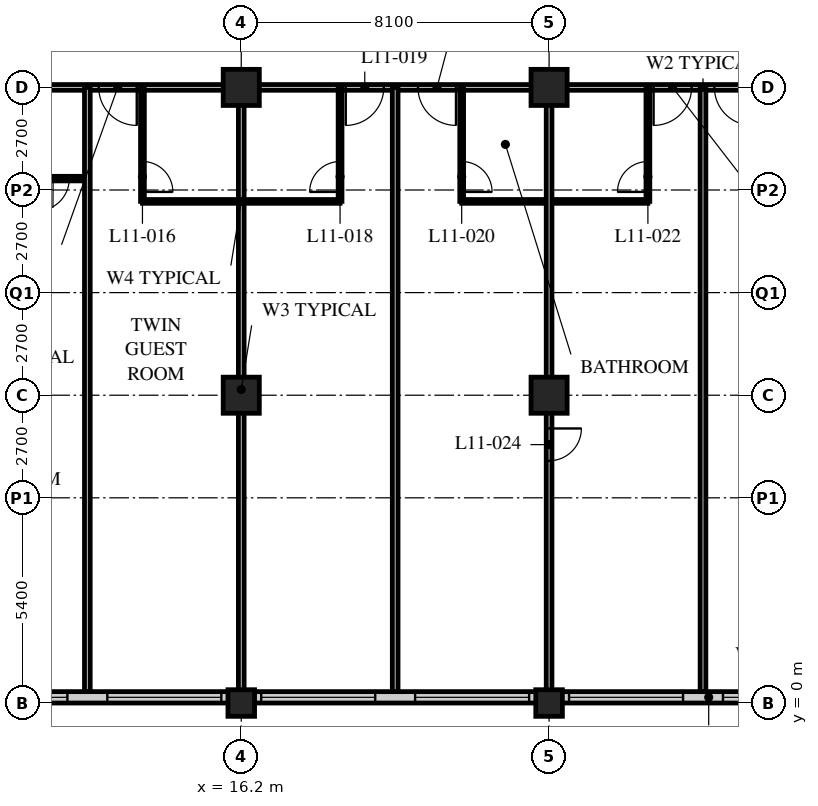
"""IFC4 building model, lengths in metres.
Left out: names, types, materials, properties, quantities, classifications, styles, units other than length and angle.
Written with IfcOpenShell. Run it as: python <this file> out.ifc"""

import sys

from ifc_helpers import new_model, si_unit, direction, frame, frame_2d, origin, origin_2d, place, context, subcontext, project, spatial, rectangle, hollow_rectangle, extrude, element, fill, save


model = new_model("IFC4")
c1 = context("Model", 3, precision=1e-05, world=origin(), true_north=direction((0.0, 1.0)))
c2 = subcontext(c1, "Body", "Model", "MODEL_VIEW")
j1 = project(units=[si_unit("LENGTHUNIT", "METRE"), si_unit("PLANEANGLEUNIT", "RADIAN")], contexts=[c1])
p1 = place(None, origin())
s1 = spatial("IfcSite", under=j1, at=p1, CompositionType="ELEMENT")
p2 = place(p1, origin())
s2 = spatial("IfcBuilding", under=s1, at=p2, CompositionType="ELEMENT")
p3 = place(p2, frame((0.0, 0.0, 50.0)))
s3 = spatial("IfcBuildingStorey", under=s2, at=p3, CompositionType="ELEMENT", Elevation=50.0)
p4 = place(p3, frame((16.2, 0.0, 0.0), z_axis=(0.0, 0.0, 1.0), x_axis=(1.0, 0.0, 0.0)))
e1 = element("IfcColumn", 1, at=p4, inside=s3, PredefinedType="COLUMN", context=c2, shape_type="SweptSolid", body=[
    extrude(hollow_rectangle(XDim=0.7, YDim=0.7, WallThickness=0.06, at=origin_2d()), origin(), (0.0, 0.0, 1.0), 3.4),
])
for number, where, z_axis, x_axis in (
    (2, (16.2, 8.1, 0.0), (0.0, 0.0, 1.0), (1.0, 0.0, 0.0)),
    (3, (16.2, 16.2, 0.0), (0.0, 0.0, 1.0), (1.0, 0.0, 0.0)),
):
    element("IfcColumn", number, at=place(p3, frame(where, z_axis=z_axis, x_axis=x_axis)), inside=s3, PredefinedType="COLUMN", context=c2, shape_type="SweptSolid", body=[
        extrude(hollow_rectangle(XDim=0.95, YDim=0.95, WallThickness=0.095, at=origin_2d()), origin(), (0.0, 0.0, 1.0), 3.4),
    ])
p5 = place(p3, frame((24.3, 0.0, 0.0), z_axis=(0.0, 0.0, 1.0), x_axis=(1.0, 0.0, 0.0)))
e4 = element("IfcColumn", 4, at=p5, inside=s3, PredefinedType="COLUMN", context=c2, shape_type="SweptSolid", body=[
    extrude(hollow_rectangle(XDim=0.7, YDim=0.7, WallThickness=0.06, at=origin_2d()), origin(), (0.0, 0.0, 1.0), 3.4),
])
for number, where, z_axis, x_axis in (
    (5, (24.3, 8.1, 0.0), (0.0, 0.0, 1.0), (1.0, 0.0, 0.0)),
    (6, (24.3, 16.2, 0.0), (0.0, 0.0, 1.0), (1.0, 0.0, 0.0)),
):
    element("IfcColumn", number, at=place(p3, frame(where, z_axis=z_axis, x_axis=x_axis)), inside=s3, PredefinedType="COLUMN", context=c2, shape_type="SweptSolid", body=[
        extrude(hollow_rectangle(XDim=0.95, YDim=0.95, WallThickness=0.095, at=origin_2d()), origin(), (0.0, 0.0, 1.0), 3.4),
    ])
p6 = place(p3, frame((8.4, 0.15, 0.0), z_axis=(0.0, 0.0, 1.0), x_axis=(1.0, 0.0, 0.0)))
e7 = element("IfcWall", 7, at=p6, inside=s3, PredefinedType="SOLIDWALL", context=c2, shape_type="SweptSolid", body=[
    extrude(rectangle(XDim=40.2, YDim=0.3, at=frame_2d((20.1, 0.0))), origin(), (0.0, 0.0, 1.0), 3.19),
])
p7 = place(p6, frame((0.225, 0.0, 0.9)))
e8 = element("IfcOpeningElement", 8, at=p7, cuts=e7, PredefinedType="OPENING", context=c2, shape_type="SweptSolid", body=[
    extrude(rectangle(XDim=3.0, YDim=2.0, at=frame_2d((1.5, 1.0))), frame((0.0, 0.16, 0.0), z_axis=(0.0, -1.0, 0.0), x_axis=(1.0, 0.0, 0.0)), (0.0, 0.0, 1.0), 0.32),
])
p8 = place(p6, frame((4.275, 0.0, 0.9)))
e9 = element("IfcOpeningElement", 9, at=p8, cuts=e7, PredefinedType="OPENING", context=c2, shape_type="SweptSolid", body=[
    extrude(rectangle(XDim=3.0, YDim=2.0, at=frame_2d((1.5, 1.0))), frame((0.0, 0.16, 0.0), z_axis=(0.0, -1.0, 0.0), x_axis=(1.0, 0.0, 0.0)), (0.0, 0.0, 1.0), 0.32),
])
p9 = place(p6, frame((8.325, 0.0, 0.9)))
e10 = element("IfcOpeningElement", 10, at=p9, cuts=e7, PredefinedType="OPENING", context=c2, shape_type="SweptSolid", body=[
    extrude(rectangle(XDim=3.0, YDim=2.0, at=frame_2d((1.5, 1.0))), frame((0.0, 0.16, 0.0), z_axis=(0.0, -1.0, 0.0), x_axis=(1.0, 0.0, 0.0)), (0.0, 0.0, 1.0), 0.32),
])
p10 = place(p6, frame((12.375, 0.0, 0.9)))
e11 = element("IfcOpeningElement", 11, at=p10, cuts=e7, PredefinedType="OPENING", context=c2, shape_type="SweptSolid", body=[
    extrude(rectangle(XDim=3.0, YDim=2.0, at=frame_2d((1.5, 1.0))), frame((0.0, 0.16, 0.0), z_axis=(0.0, -1.0, 0.0), x_axis=(1.0, 0.0, 0.0)), (0.0, 0.0, 1.0), 0.32),
])
p11 = place(p6, frame((16.425, 0.0, 0.9)))
e12 = element("IfcOpeningElement", 12, at=p11, cuts=e7, PredefinedType="OPENING", context=c2, shape_type="SweptSolid", body=[
    extrude(rectangle(XDim=3.0, YDim=2.0, at=frame_2d((1.5, 1.0))), frame((0.0, 0.16, 0.0), z_axis=(0.0, -1.0, 0.0), x_axis=(1.0, 0.0, 0.0)), (0.0, 0.0, 1.0), 0.32),
])
p12 = place(p6, frame((20.475, 0.0, 0.9)))
e13 = element("IfcOpeningElement", 13, at=p12, cuts=e7, PredefinedType="OPENING", context=c2, shape_type="SweptSolid", body=[
    extrude(rectangle(XDim=3.0, YDim=2.0, at=frame_2d((1.5, 1.0))), frame((0.0, 0.16, 0.0), z_axis=(0.0, -1.0, 0.0), x_axis=(1.0, 0.0, 0.0)), (0.0, 0.0, 1.0), 0.32),
])
p13 = place(p6, frame((24.525, 0.0, 0.9)))
e14 = element("IfcOpeningElement", 14, at=p13, cuts=e7, PredefinedType="OPENING", context=c2, shape_type="SweptSolid", body=[
    extrude(rectangle(XDim=3.0, YDim=2.0, at=frame_2d((1.5, 1.0))), frame((0.0, 0.16, 0.0), z_axis=(0.0, -1.0, 0.0), x_axis=(1.0, 0.0, 0.0)), (0.0, 0.0, 1.0), 0.32),
])
p14 = place(p6, frame((28.575, 0.0, 0.9)))
e15 = element("IfcOpeningElement", 15, at=p14, cuts=e7, PredefinedType="OPENING", context=c2, shape_type="SweptSolid", body=[
    extrude(rectangle(XDim=3.0, YDim=2.0, at=frame_2d((1.5, 1.0))), frame((0.0, 0.16, 0.0), z_axis=(0.0, -1.0, 0.0), x_axis=(1.0, 0.0, 0.0)), (0.0, 0.0, 1.0), 0.32),
])
p15 = place(p6, frame((32.625, 0.0, 0.9)))
e16 = element("IfcOpeningElement", 16, at=p15, cuts=e7, PredefinedType="OPENING", context=c2, shape_type="SweptSolid", body=[
    extrude(rectangle(XDim=3.0, YDim=2.0, at=frame_2d((1.5, 1.0))), frame((0.0, 0.16, 0.0), z_axis=(0.0, -1.0, 0.0), x_axis=(1.0, 0.0, 0.0)), (0.0, 0.0, 1.0), 0.32),
])
p16 = place(p6, frame((36.675, 0.0, 0.9)))
e17 = element("IfcOpeningElement", 17, at=p16, cuts=e7, PredefinedType="OPENING", context=c2, shape_type="SweptSolid", body=[
    extrude(rectangle(XDim=3.0, YDim=2.0, at=frame_2d((1.5, 1.0))), frame((0.0, 0.16, 0.0), z_axis=(0.0, -1.0, 0.0), x_axis=(1.0, 0.0, 0.0)), (0.0, 0.0, 1.0), 0.32),
])
p17 = place(p3, frame((8.1, 16.2, 0.0), z_axis=(0.0, 0.0, 1.0), x_axis=(1.0, 0.0, 0.0)))
e18 = element("IfcWall", 18, at=p17, inside=s3, PredefinedType="PARTITIONING", context=c2, shape_type="SweptSolid", body=[
    extrude(rectangle(XDim=40.5, YDim=0.15, at=frame_2d((20.25, 0.0))), origin(), (0.0, 0.0, 1.0), 2.578),
])
p18 = place(p17, frame((4.35, 0.0, 0.0)))
e19 = element("IfcOpeningElement", 19, at=p18, cuts=e18, PredefinedType="OPENING", context=c2, shape_type="SweptSolid", body=[
    extrude(rectangle(XDim=1.0, YDim=2.1, at=frame_2d((0.5, 1.05))), frame((0.0, 0.085, 0.0), z_axis=(0.0, -1.0, 0.0), x_axis=(1.0, 0.0, 0.0)), (0.0, 0.0, 1.0), 0.17),
])
p19 = place(p17, frame((10.85, 0.0, 0.0)))
e20 = element("IfcOpeningElement", 20, at=p19, cuts=e18, PredefinedType="OPENING", context=c2, shape_type="SweptSolid", body=[
    extrude(rectangle(XDim=1.0, YDim=2.1, at=frame_2d((0.5, 1.05))), frame((0.0, 0.085, 0.0), z_axis=(0.0, -1.0, 0.0), x_axis=(1.0, 0.0, 0.0)), (0.0, 0.0, 1.0), 0.17),
])
p20 = place(p17, frame((12.75, 0.0, 0.0)))
e21 = element("IfcOpeningElement", 21, at=p20, cuts=e18, PredefinedType="OPENING", context=c2, shape_type="SweptSolid", body=[
    extrude(rectangle(XDim=1.0, YDim=2.1, at=frame_2d((0.5, 1.05))), frame((0.0, 0.085, 0.0), z_axis=(0.0, -1.0, 0.0), x_axis=(1.0, 0.0, 0.0)), (0.0, 0.0, 1.0), 0.17),
])
p21 = place(p17, frame((18.95, 0.0, 0.0)))
e22 = element("IfcOpeningElement", 22, at=p21, cuts=e18, PredefinedType="OPENING", context=c2, shape_type="SweptSolid", body=[
    extrude(rectangle(XDim=1.0, YDim=2.1, at=frame_2d((0.5, 1.05))), frame((0.0, 0.085, 0.0), z_axis=(0.0, -1.0, 0.0), x_axis=(1.0, 0.0, 0.0)), (0.0, 0.0, 1.0), 0.17),
])
p22 = place(p17, frame((20.55, 0.0, 0.0)))
e23 = element("IfcOpeningElement", 23, at=p22, cuts=e18, PredefinedType="OPENING", context=c2, shape_type="SweptSolid", body=[
    extrude(rectangle(XDim=1.0, YDim=2.1, at=frame_2d((0.5, 1.05))), frame((0.0, 0.085, 0.0), z_axis=(0.0, -1.0, 0.0), x_axis=(1.0, 0.0, 0.0)), (0.0, 0.0, 1.0), 0.17),
])
p23 = place(p17, frame((27.05, 0.0, 0.0)))
e24 = element("IfcOpeningElement", 24, at=p23, cuts=e18, PredefinedType="OPENING", context=c2, shape_type="SweptSolid", body=[
    extrude(rectangle(XDim=1.0, YDim=2.1, at=frame_2d((0.5, 1.05))), frame((0.0, 0.085, 0.0), z_axis=(0.0, -1.0, 0.0), x_axis=(1.0, 0.0, 0.0)), (0.0, 0.0, 1.0), 0.17),
])
p24 = place(p17, frame((28.95, 0.0, 0.0)))
e25 = element("IfcOpeningElement", 25, at=p24, cuts=e18, PredefinedType="OPENING", context=c2, shape_type="SweptSolid", body=[
    extrude(rectangle(XDim=1.0, YDim=2.1, at=frame_2d((0.5, 1.05))), frame((0.0, 0.085, 0.0), z_axis=(0.0, -1.0, 0.0), x_axis=(1.0, 0.0, 0.0)), (0.0, 0.0, 1.0), 0.17),
])
p25 = place(p17, frame((34.85, 0.0, 0.0)))
e26 = element("IfcOpeningElement", 26, at=p25, cuts=e18, PredefinedType="OPENING", context=c2, shape_type="SweptSolid", body=[
    extrude(rectangle(XDim=1.0, YDim=2.1, at=frame_2d((0.5, 1.05))), frame((0.0, 0.085, 0.0), z_axis=(0.0, -1.0, 0.0), x_axis=(1.0, 0.0, 0.0)), (0.0, 0.0, 1.0), 0.17),
])
p26 = place(p17, frame((1.525, 0.0, 0.0)))
e27 = element("IfcOpeningElement", 27, at=p26, cuts=e18, PredefinedType="OPENING", context=c2, shape_type="SweptSolid", body=[
    extrude(rectangle(XDim=1.0, YDim=2.1, at=frame_2d((0.5, 1.05))), frame((0.0, 0.085, 0.0), z_axis=(0.0, -1.0, 0.0), x_axis=(1.0, 0.0, 0.0)), (0.0, 0.0, 1.0), 0.17),
])
p27 = place(p17, frame((37.975, 0.0, 0.0)))
e28 = element("IfcOpeningElement", 28, at=p27, cuts=e18, PredefinedType="OPENING", context=c2, shape_type="SweptSolid", body=[
    extrude(rectangle(XDim=1.0, YDim=2.1, at=frame_2d((0.5, 1.05))), frame((0.0, 0.085, 0.0), z_axis=(0.0, -1.0, 0.0), x_axis=(1.0, 0.0, 0.0)), (0.0, 0.0, 1.0), 0.17),
])
p28 = place(p3, frame((13.6, 13.2, 0.0), z_axis=(0.0, 0.0, 1.0), x_axis=(1.0, 0.0, 0.0)))
e29 = element("IfcWall", 29, at=p28, inside=s3, PredefinedType="PARTITIONING", context=c2, shape_type="SweptSolid", body=[
    extrude(rectangle(XDim=5.2, YDim=0.1, at=frame_2d((2.6, 0.0))), origin(), (0.0, 0.0, 1.0), 3.19),
])
p29 = place(p3, frame((13.6, 16.2, 0.0), z_axis=(0.0, 0.0, 1.0), x_axis=(0.0, -1.0, 0.0)))
e30 = element("IfcWall", 30, at=p29, inside=s3, PredefinedType="PARTITIONING", context=c2, shape_type="SweptSolid", body=[
    extrude(rectangle(XDim=3.0, YDim=0.1, at=frame_2d((1.5, 0.0))), origin(), (0.0, 0.0, 1.0), 3.19),
])
p30 = place(p29, frame((1.95, 0.0, 0.0)))
e31 = element("IfcOpeningElement", 31, at=p30, cuts=e30, PredefinedType="OPENING", context=c2, shape_type="SweptSolid", body=[
    extrude(rectangle(XDim=0.8, YDim=2.1, at=frame_2d((0.4, 1.05))), frame((0.0, 0.06, 0.0), z_axis=(0.0, -1.0, 0.0), x_axis=(1.0, 0.0, 0.0)), (0.0, 0.0, 1.0), 0.12),
])
p31 = place(p3, frame((16.2, 16.2, 0.0), z_axis=(0.0, 0.0, 1.0), x_axis=(0.0, -1.0, 0.0)))
e32 = element("IfcWall", 32, at=p31, inside=s3, PredefinedType="PARTITIONING", context=c2, shape_type="SweptSolid", body=[
    extrude(rectangle(XDim=15.9, YDim=0.15, at=frame_2d((7.95, 0.0))), origin(), (0.0, 0.0, 1.0), 2.578),
])
p32 = place(p3, frame((18.8, 16.2, 0.0), z_axis=(0.0, 0.0, 1.0), x_axis=(0.0, -1.0, 0.0)))
e33 = element("IfcWall", 33, at=p32, inside=s3, PredefinedType="PARTITIONING", context=c2, shape_type="SweptSolid", body=[
    extrude(rectangle(XDim=3.0, YDim=0.1, at=frame_2d((1.5, 0.0))), origin(), (0.0, 0.0, 1.0), 3.19),
])
p33 = place(p32, frame((1.95, 0.0, 0.0)))
e34 = element("IfcOpeningElement", 34, at=p33, cuts=e33, PredefinedType="OPENING", context=c2, shape_type="SweptSolid", body=[
    extrude(rectangle(XDim=0.8, YDim=2.1, at=frame_2d((0.4, 1.05))), frame((0.0, 0.06, 0.0), z_axis=(0.0, -1.0, 0.0), x_axis=(1.0, 0.0, 0.0)), (0.0, 0.0, 1.0), 0.12),
])
p34 = place(p3, frame((20.25, 16.2, 0.0), z_axis=(0.0, 0.0, 1.0), x_axis=(0.0, -1.0, 0.0)))
e35 = element("IfcWall", 35, at=p34, inside=s3, PredefinedType="PARTITIONING", context=c2, shape_type="SweptSolid", body=[
    extrude(rectangle(XDim=15.9, YDim=0.15, at=frame_2d((7.95, 0.0))), origin(), (0.0, 0.0, 1.0), 3.19),
])
p35 = place(p3, frame((22.0, 13.2, 0.0), z_axis=(0.0, 0.0, 1.0), x_axis=(1.0, 0.0, 0.0)))
e36 = element("IfcWall", 36, at=p35, inside=s3, PredefinedType="PARTITIONING", context=c2, shape_type="SweptSolid", body=[
    extrude(rectangle(XDim=4.9, YDim=0.1, at=frame_2d((2.45, 0.0))), origin(), (0.0, 0.0, 1.0), 3.19),
])
p36 = place(p3, frame((22.0, 16.2, 0.0), z_axis=(0.0, 0.0, 1.0), x_axis=(0.0, -1.0, 0.0)))
e37 = element("IfcWall", 37, at=p36, inside=s3, PredefinedType="PARTITIONING", context=c2, shape_type="SweptSolid", body=[
    extrude(rectangle(XDim=3.0, YDim=0.1, at=frame_2d((1.5, 0.0))), origin(), (0.0, 0.0, 1.0), 3.19),
])
p37 = place(p36, frame((1.95, 0.0, 0.0)))
e38 = element("IfcOpeningElement", 38, at=p37, cuts=e37, PredefinedType="OPENING", context=c2, shape_type="SweptSolid", body=[
    extrude(rectangle(XDim=0.8, YDim=2.1, at=frame_2d((0.4, 1.05))), frame((0.0, 0.06, 0.0), z_axis=(0.0, -1.0, 0.0), x_axis=(1.0, 0.0, 0.0)), (0.0, 0.0, 1.0), 0.12),
])
p38 = place(p3, frame((26.9, 16.2, 0.0), z_axis=(0.0, 0.0, 1.0), x_axis=(0.0, -1.0, 0.0)))
e39 = element("IfcWall", 39, at=p38, inside=s3, PredefinedType="PARTITIONING", context=c2, shape_type="SweptSolid", body=[
    extrude(rectangle(XDim=3.0, YDim=0.1, at=frame_2d((1.5, 0.0))), origin(), (0.0, 0.0, 1.0), 3.19),
])
p39 = place(p38, frame((1.95, 0.0, 0.0)))
e40 = element("IfcOpeningElement", 40, at=p39, cuts=e39, PredefinedType="OPENING", context=c2, shape_type="SweptSolid", body=[
    extrude(rectangle(XDim=0.8, YDim=2.1, at=frame_2d((0.4, 1.05))), frame((0.0, 0.06, 0.0), z_axis=(0.0, -1.0, 0.0), x_axis=(1.0, 0.0, 0.0)), (0.0, 0.0, 1.0), 0.12),
])
p40 = place(p3, frame((24.3, 16.2, 0.0), z_axis=(0.0, 0.0, 1.0), x_axis=(0.0, -1.0, 0.0)))
e41 = element("IfcWall", 41, at=p40, inside=s3, PredefinedType="PARTITIONING", context=c2, shape_type="SweptSolid", body=[
    extrude(rectangle(XDim=15.9, YDim=0.15, at=frame_2d((7.95, 0.0))), origin(), (0.0, 0.0, 1.0), 2.578),
])
p41 = place(p40, frame((8.975, 0.0, 0.0)))
e42 = element("IfcOpeningElement", 42, at=p41, cuts=e41, PredefinedType="OPENING", context=c2, shape_type="SweptSolid", body=[
    extrude(rectangle(XDim=0.85, YDim=2.1, at=frame_2d((0.425, 1.05))), frame((0.0, 0.085, 0.0), z_axis=(0.0, -1.0, 0.0), x_axis=(1.0, 0.0, 0.0)), (0.0, 0.0, 1.0), 0.17),
])
p42 = place(p3, frame((28.35, 16.2, 0.0), z_axis=(0.0, 0.0, 1.0), x_axis=(0.0, -1.0, 0.0)))
e43 = element("IfcWall", 43, at=p42, inside=s3, PredefinedType="PARTITIONING", context=c2, shape_type="SweptSolid", body=[
    extrude(rectangle(XDim=15.9, YDim=0.15, at=frame_2d((7.95, 0.0))), origin(), (0.0, 0.0, 1.0), 3.19),
])
p43 = place(p3, frame((4.1, 13.8, 0.0), z_axis=(0.0, 0.0, 1.0), x_axis=(1.0, 0.0, 0.0)))
e44 = element("IfcWall", 44, at=p43, inside=s3, PredefinedType="PARTITIONING", context=c2, shape_type="SweptSolid", body=[
    extrude(rectangle(XDim=8.05, YDim=0.12, at=frame_2d((4.025, 0.0))), origin(), (0.0, 0.0, 1.0), 3.19),
])
p44 = place(p43, frame((6.725, 0.0, 0.0)))
e45 = element("IfcOpeningElement", 45, at=p44, cuts=e44, PredefinedType="OPENING", context=c2, shape_type="SweptSolid", body=[
    extrude(rectangle(XDim=0.85, YDim=2.1, at=frame_2d((0.425, 1.05))), frame((0.0, 0.07, 0.0), z_axis=(0.0, -1.0, 0.0), x_axis=(1.0, 0.0, 0.0)), (0.0, 0.0, 1.0), 0.14),
])
p45 = place(p43, frame((2.875, 0.0, 0.0)))
e46 = element("IfcOpeningElement", 46, at=p45, cuts=e44, PredefinedType="OPENING", context=c2, shape_type="SweptSolid", body=[
    extrude(rectangle(XDim=0.85, YDim=2.1, at=frame_2d((0.425, 1.05))), frame((0.0, 0.07, 0.0), z_axis=(0.0, -1.0, 0.0), x_axis=(1.0, 0.0, 0.0)), (0.0, 0.0, 1.0), 0.14),
])
p46 = place(p3, frame((12.15, 16.2, 0.0), z_axis=(0.0, 0.0, 1.0), x_axis=(0.0, -1.0, 0.0)))
e47 = element("IfcWall", 47, at=p46, inside=s3, PredefinedType="PARTITIONING", context=c2, shape_type="SweptSolid", body=[
    extrude(rectangle(XDim=15.9, YDim=0.15, at=frame_2d((7.95, 0.0))), origin(), (0.0, 0.0, 1.0), 3.19),
])
p47 = place(p7, origin())
e48 = element("IfcWindow", 48, at=p47, inside=s3, PartitioningType="SINGLE_PANEL", PredefinedType="WINDOW", context=c2, shape_type="SweptSolid", body=[
    extrude(rectangle(XDim=3.0, YDim=2.0, at=frame_2d((1.5, 1.0))), frame((0.0, 0.03, 0.0), z_axis=(0.0, -1.0, 0.0), x_axis=(1.0, 0.0, 0.0)), (0.0, 0.0, 1.0), 0.06),
])
fill(e8, e48)
p48 = place(p8, origin())
e49 = element("IfcWindow", 49, at=p48, inside=s3, PartitioningType="SINGLE_PANEL", PredefinedType="WINDOW", context=c2, shape_type="SweptSolid", body=[
    extrude(rectangle(XDim=3.0, YDim=2.0, at=frame_2d((1.5, 1.0))), frame((0.0, 0.03, 0.0), z_axis=(0.0, -1.0, 0.0), x_axis=(1.0, 0.0, 0.0)), (0.0, 0.0, 1.0), 0.06),
])
fill(e9, e49)
p49 = place(p9, origin())
e50 = element("IfcWindow", 50, at=p49, inside=s3, PartitioningType="SINGLE_PANEL", PredefinedType="WINDOW", context=c2, shape_type="SweptSolid", body=[
    extrude(rectangle(XDim=3.0, YDim=2.0, at=frame_2d((1.5, 1.0))), frame((0.0, 0.03, 0.0), z_axis=(0.0, -1.0, 0.0), x_axis=(1.0, 0.0, 0.0)), (0.0, 0.0, 1.0), 0.06),
])
fill(e10, e50)
p50 = place(p10, origin())
e51 = element("IfcWindow", 51, at=p50, inside=s3, PartitioningType="SINGLE_PANEL", PredefinedType="WINDOW", context=c2, shape_type="SweptSolid", body=[
    extrude(rectangle(XDim=3.0, YDim=2.0, at=frame_2d((1.5, 1.0))), frame((0.0, 0.03, 0.0), z_axis=(0.0, -1.0, 0.0), x_axis=(1.0, 0.0, 0.0)), (0.0, 0.0, 1.0), 0.06),
])
fill(e11, e51)
p51 = place(p11, origin())
e52 = element("IfcWindow", 52, at=p51, inside=s3, PartitioningType="SINGLE_PANEL", PredefinedType="WINDOW", context=c2, shape_type="SweptSolid", body=[
    extrude(rectangle(XDim=3.0, YDim=2.0, at=frame_2d((1.5, 1.0))), frame((0.0, 0.03, 0.0), z_axis=(0.0, -1.0, 0.0), x_axis=(1.0, 0.0, 0.0)), (0.0, 0.0, 1.0), 0.06),
])
fill(e12, e52)
p52 = place(p12, origin())
e53 = element("IfcWindow", 53, at=p52, inside=s3, PartitioningType="SINGLE_PANEL", PredefinedType="WINDOW", context=c2, shape_type="SweptSolid", body=[
    extrude(rectangle(XDim=3.0, YDim=2.0, at=frame_2d((1.5, 1.0))), frame((0.0, 0.03, 0.0), z_axis=(0.0, -1.0, 0.0), x_axis=(1.0, 0.0, 0.0)), (0.0, 0.0, 1.0), 0.06),
])
fill(e13, e53)
p53 = place(p30, origin())
e54 = element("IfcDoor", 54, at=p53, inside=s3, OperationType="SINGLE_SWING_RIGHT", PredefinedType="DOOR", context=c2, shape_type="SweptSolid", body=[
    extrude(rectangle(XDim=0.8, YDim=2.1, at=frame_2d((0.4, 1.05))), frame((0.0, 0.025, 0.0), z_axis=(0.0, -1.0, 0.0), x_axis=(1.0, 0.0, 0.0)), (0.0, 0.0, 1.0), 0.05),
])
fill(e31, e54)
p54 = place(p18, origin())
e55 = element("IfcDoor", 55, at=p54, inside=s3, OperationType="SINGLE_SWING_LEFT", PredefinedType="DOOR", context=c2, shape_type="SweptSolid", body=[
    extrude(rectangle(XDim=1.0, YDim=2.1, at=frame_2d((0.5, 1.05))), frame((0.0, 0.025, 0.0), z_axis=(0.0, -1.0, 0.0), x_axis=(1.0, 0.0, 0.0)), (0.0, 0.0, 1.0), 0.05),
])
fill(e19, e55)
p55 = place(p33, origin())
e56 = element("IfcDoor", 56, at=p55, inside=s3, OperationType="SINGLE_SWING_LEFT", PredefinedType="DOOR", context=c2, shape_type="SweptSolid", body=[
    extrude(rectangle(XDim=0.8, YDim=2.1, at=frame_2d((0.4, 1.05))), frame((0.0, 0.025, 0.0), z_axis=(0.0, -1.0, 0.0), x_axis=(1.0, 0.0, 0.0)), (0.0, 0.0, 1.0), 0.05),
])
fill(e34, e56)
p56 = place(p19, origin())
e57 = element("IfcDoor", 57, at=p56, inside=s3, OperationType="SINGLE_SWING_RIGHT", PredefinedType="DOOR", context=c2, shape_type="SweptSolid", body=[
    extrude(rectangle(XDim=1.0, YDim=2.1, at=frame_2d((0.5, 1.05))), frame((0.0, 0.025, 0.0), z_axis=(0.0, -1.0, 0.0), x_axis=(1.0, 0.0, 0.0)), (0.0, 0.0, 1.0), 0.05),
])
fill(e20, e57)
p57 = place(p37, origin())
e58 = element("IfcDoor", 58, at=p57, inside=s3, OperationType="SINGLE_SWING_RIGHT", PredefinedType="DOOR", context=c2, shape_type="SweptSolid", body=[
    extrude(rectangle(XDim=0.8, YDim=2.1, at=frame_2d((0.4, 1.05))), frame((0.0, 0.025, 0.0), z_axis=(0.0, -1.0, 0.0), x_axis=(1.0, 0.0, 0.0)), (0.0, 0.0, 1.0), 0.05),
])
fill(e38, e58)
p58 = place(p20, origin())
e59 = element("IfcDoor", 59, at=p58, inside=s3, OperationType="SINGLE_SWING_LEFT", PredefinedType="DOOR", context=c2, shape_type="SweptSolid", body=[
    extrude(rectangle(XDim=1.0, YDim=2.1, at=frame_2d((0.5, 1.05))), frame((0.0, 0.025, 0.0), z_axis=(0.0, -1.0, 0.0), x_axis=(1.0, 0.0, 0.0)), (0.0, 0.0, 1.0), 0.05),
])
fill(e21, e59)
p59 = place(p39, origin())
e60 = element("IfcDoor", 60, at=p59, inside=s3, OperationType="SINGLE_SWING_LEFT", PredefinedType="DOOR", context=c2, shape_type="SweptSolid", body=[
    extrude(rectangle(XDim=0.8, YDim=2.1, at=frame_2d((0.4, 1.05))), frame((0.0, 0.025, 0.0), z_axis=(0.0, -1.0, 0.0), x_axis=(1.0, 0.0, 0.0)), (0.0, 0.0, 1.0), 0.05),
])
fill(e40, e60)
p60 = place(p21, origin())
e61 = element("IfcDoor", 61, at=p60, inside=s3, OperationType="SINGLE_SWING_RIGHT", PredefinedType="DOOR", context=c2, shape_type="SweptSolid", body=[
    extrude(rectangle(XDim=1.0, YDim=2.1, at=frame_2d((0.5, 1.05))), frame((0.0, 0.025, 0.0), z_axis=(0.0, -1.0, 0.0), x_axis=(1.0, 0.0, 0.0)), (0.0, 0.0, 1.0), 0.05),
])
fill(e22, e61)
p61 = place(p41, origin())
e62 = element("IfcDoor", 62, at=p61, inside=s3, OperationType="SINGLE_SWING_LEFT", PredefinedType="DOOR", context=c2, shape_type="SweptSolid", body=[
    extrude(rectangle(XDim=0.85, YDim=2.1, at=frame_2d((0.425, 1.05))), frame((0.0, 0.025, 0.0), z_axis=(0.0, -1.0, 0.0), x_axis=(1.0, 0.0, 0.0)), (0.0, 0.0, 1.0), 0.05),
])
fill(e42, e62)
p62 = place(p22, origin())
e63 = element("IfcDoor", 63, at=p62, inside=s3, OperationType="SINGLE_SWING_LEFT", PredefinedType="DOOR", context=c2, shape_type="SweptSolid", body=[
    extrude(rectangle(XDim=1.0, YDim=2.1, at=frame_2d((0.5, 1.05))), frame((0.0, 0.025, 0.0), z_axis=(0.0, -1.0, 0.0), x_axis=(1.0, 0.0, 0.0)), (0.0, 0.0, 1.0), 0.05),
])
fill(e23, e63)
p63 = place(p44, origin())
e64 = element("IfcDoor", 64, at=p63, inside=s3, OperationType="SINGLE_SWING_RIGHT", PredefinedType="DOOR", context=c2, shape_type="SweptSolid", body=[
    extrude(rectangle(XDim=0.85, YDim=2.1, at=frame_2d((0.425, 1.05))), frame((0.0, 0.025, 0.0), z_axis=(0.0, -1.0, 0.0), x_axis=(1.0, 0.0, 0.0)), (0.0, 0.0, 1.0), 0.05),
])
fill(e45, e64)
save(model, sys.argv[1])
